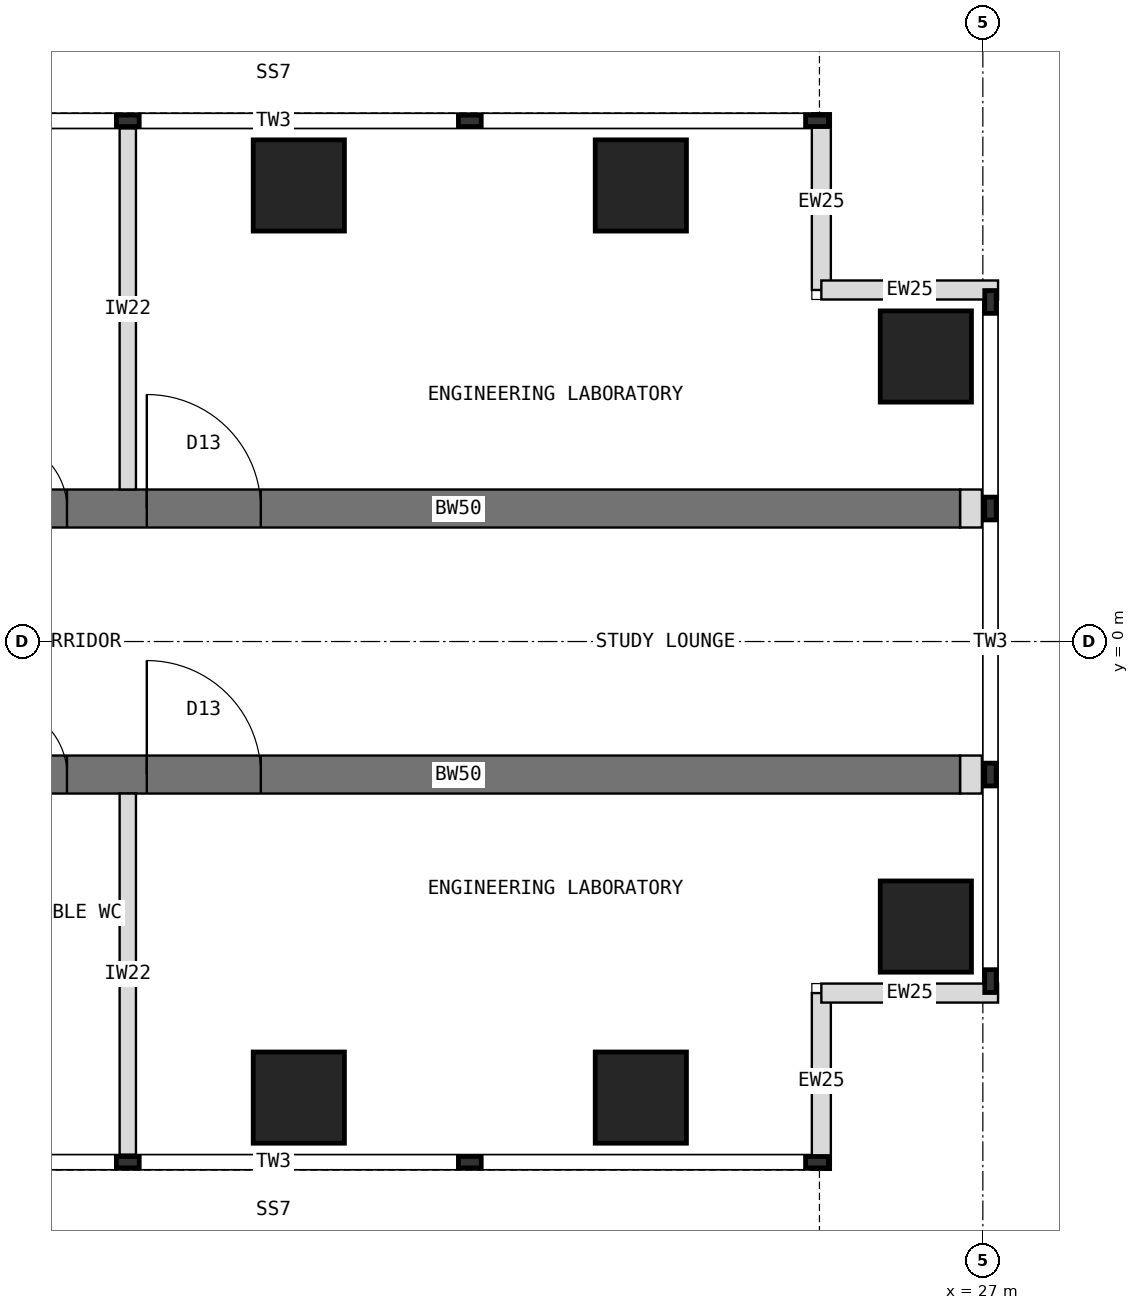
"""IFC4 building model, lengths in metres.
Left out: names, types, materials, properties, quantities, classifications, styles, units other than length and angle.
Written with IfcOpenShell. Run it as: python <this file> out.ifc"""

import sys

from ifc_helpers import new_model, si_unit, direction, frame, frame_2d, origin, origin_2d, place, context, subcontext, project, spatial, rectangle, extrude, element, fill, save


model = new_model("IFC4")
c1 = context("Model", 3, precision=1e-05, world=origin(), true_north=direction((0.0, 1.0)))
c2 = subcontext(c1, "Body", "Model", "MODEL_VIEW")
j1 = project(units=[si_unit("LENGTHUNIT", "METRE"), si_unit("PLANEANGLEUNIT", "RADIAN")], contexts=[c1])
p1 = place(None, origin())
s1 = spatial("IfcSite", under=j1, at=p1, CompositionType="ELEMENT")
p2 = place(p1, origin())
s2 = spatial("IfcBuilding", under=s1, at=p2, CompositionType="ELEMENT")
p3 = place(p2, frame((0.0, 0.0, 174.5)))
s3 = spatial("IfcBuildingStorey", under=s2, at=p3, CompositionType="ELEMENT", Elevation=174.5)
p4 = place(p3, frame((13.5, 1.75, 0.0), z_axis=(0.0, 0.0, 1.0), x_axis=(1.0, 0.0, 0.0)))
e1 = element("IfcWall", 1, at=p4, inside=s3, PredefinedType="SHEAR", context=c2, shape_type="SweptSolid", body=[
    extrude(rectangle(XDim=13.2, YDim=0.5, at=frame_2d((6.6, 0.0))), origin(), (0.0, 0.0, 1.0), 4.0),
])
p5 = place(p4, frame((0.55, 0.0, 0.0)))
e2 = element("IfcOpeningElement", 2, at=p5, cuts=e1, PredefinedType="OPENING", context=c2, shape_type="SweptSolid", body=[
    extrude(rectangle(XDim=0.9, YDim=2.1, at=frame_2d((0.45, 1.05))), frame((0.0, 0.26, 0.0), z_axis=(0.0, -1.0, 0.0), x_axis=(1.0, 0.0, 0.0)), (0.0, 0.0, 1.0), 0.52),
])
p6 = place(p4, frame((2.5, 0.0, 0.0)))
e3 = element("IfcOpeningElement", 3, at=p6, cuts=e1, PredefinedType="OPENING", context=c2, shape_type="SweptSolid", body=[
    extrude(rectangle(XDim=1.5, YDim=2.1, at=frame_2d((0.75, 1.05))), frame((0.0, 0.26, 0.0), z_axis=(0.0, -1.0, 0.0), x_axis=(1.0, 0.0, 0.0)), (0.0, 0.0, 1.0), 0.52),
])
p7 = place(p3, frame((13.5, -1.75, 0.0), z_axis=(0.0, 0.0, 1.0), x_axis=(1.0, 0.0, 0.0)))
e4 = element("IfcWall", 4, at=p7, inside=s3, PredefinedType="SHEAR", context=c2, shape_type="SweptSolid", body=[
    extrude(rectangle(XDim=13.2, YDim=0.5, at=frame_2d((6.6, 0.0))), origin(), (0.0, 0.0, 1.0), 4.0),
])
p8 = place(p7, frame((0.55, 0.0, 0.0)))
e5 = element("IfcOpeningElement", 5, at=p8, cuts=e4, PredefinedType="OPENING", context=c2, shape_type="SweptSolid", body=[
    extrude(rectangle(XDim=0.9, YDim=2.1, at=frame_2d((0.45, 1.05))), frame((0.0, 0.26, 0.0), z_axis=(0.0, -1.0, 0.0), x_axis=(1.0, 0.0, 0.0)), (0.0, 0.0, 1.0), 0.52),
])
p9 = place(p7, frame((2.5, 0.0, 0.0)))
e6 = element("IfcOpeningElement", 6, at=p9, cuts=e4, PredefinedType="OPENING", context=c2, shape_type="SweptSolid", body=[
    extrude(rectangle(XDim=1.5, YDim=2.1, at=frame_2d((0.75, 1.05))), frame((0.0, 0.26, 0.0), z_axis=(0.0, -1.0, 0.0), x_axis=(1.0, 0.0, 0.0)), (0.0, 0.0, 1.0), 0.52),
])
for number, where, z_axis, x_axis in (
    (7, (18.0, 6.0, 0.0), (0.0, 0.0, 1.0), (1.0, 0.0, 0.0)),
    (8, (18.0, -6.0, 0.0), (0.0, 0.0, 1.0), (1.0, 0.0, 0.0)),
    (9, (22.5, 6.0, 0.0), (0.0, 0.0, 1.0), (1.0, 0.0, 0.0)),
    (10, (22.5, -6.0, 0.0), (0.0, 0.0, 1.0), (1.0, 0.0, 0.0)),
    (11, (26.25, 3.75, 0.0), (0.0, 0.0, 1.0), (1.0, 0.0, 0.0)),
    (12, (26.25, -3.75, 0.0), (0.0, 0.0, 1.0), (1.0, 0.0, 0.0)),
):
    element("IfcColumn", number, at=place(p3, frame(where, z_axis=z_axis, x_axis=x_axis)), inside=s3, PredefinedType="COLUMN", context=c2, shape_type="SweptSolid", body=[
        extrude(rectangle(XDim=1.2, YDim=1.2, at=origin_2d()), origin(), (0.0, 0.0, 1.0), 4.0),
    ])
for number, where, z_axis, x_axis in (
    (13, (24.875, 6.95, 0.0), (0.0, 0.0, 1.0), (0.0, -1.0, 0.0)),
    (14, (24.875, 4.625, 0.0), (0.0, 0.0, 1.0), (1.0, 0.0, 0.0)),
    (15, (24.875, -6.95, 0.0), (0.0, 0.0, 1.0), (0.0, 1.0, 0.0)),
    (16, (24.875, -4.625, 0.0), (0.0, 0.0, 1.0), (1.0, 0.0, 0.0)),
):
    element("IfcWall", number, at=place(p3, frame(where, z_axis=z_axis, x_axis=x_axis)), inside=s3, PredefinedType="STANDARD", context=c2, shape_type="SweptSolid", body=[
        extrude(rectangle(XDim=2.325, YDim=0.25, at=frame_2d((1.163, 0.0))), origin(), (0.0, 0.0, 1.0), 3.8),
    ])
for number, where, z_axis, x_axis in (
    (17, (26.7, 1.75, 0.0), (0.0, 0.0, 1.0), (1.0, 0.0, 0.0)),
    (18, (26.7, -1.75, 0.0), (0.0, 0.0, 1.0), (1.0, 0.0, 0.0)),
):
    element("IfcWall", number, at=place(p3, frame(where, z_axis=z_axis, x_axis=x_axis)), inside=s3, PredefinedType="PARTITIONING", context=c2, shape_type="SweptSolid", body=[
        extrude(rectangle(XDim=0.288, YDim=0.5, at=frame_2d((0.144, 0.0))), origin(), (0.0, 0.0, 1.0), 3.8),
    ])
for number, where, z_axis, x_axis in (
    (19, (15.75, 2.0, 0.0), (0.0, 0.0, 1.0), (0.0, 1.0, 0.0)),
    (20, (15.75, -2.0, 0.0), (0.0, 0.0, 1.0), (0.0, -1.0, 0.0)),
):
    element("IfcWall", number, at=place(p3, frame(where, z_axis=z_axis, x_axis=x_axis)), inside=s3, PredefinedType="PARTITIONING", context=c2, shape_type="SweptSolid", body=[
        extrude(rectangle(XDim=4.75, YDim=0.215, at=frame_2d((2.375, 0.0))), origin(), (0.0, 0.0, 1.0), 3.8),
    ])
p10 = place(p5, origin())
e21 = element("IfcDoor", 21, at=p10, inside=s3, OperationType="SINGLE_SWING_LEFT", PredefinedType="DOOR", context=c2, shape_type="SweptSolid", body=[
    extrude(rectangle(XDim=0.9, YDim=2.1, at=frame_2d((0.45, 1.05))), frame((0.0, 0.025, 0.0), z_axis=(0.0, -1.0, 0.0), x_axis=(1.0, 0.0, 0.0)), (0.0, 0.0, 1.0), 0.05),
])
fill(e2, e21)
p11 = place(p6, origin())
e22 = element("IfcDoor", 22, at=p11, inside=s3, OperationType="DOUBLE_DOOR_SINGLE_SWING", PredefinedType="DOOR", context=c2, shape_type="SweptSolid", body=[
    extrude(rectangle(XDim=1.5, YDim=2.1, at=frame_2d((0.75, 1.05))), frame((0.0, 0.025, 0.0), z_axis=(0.0, -1.0, 0.0), x_axis=(1.0, 0.0, 0.0)), (0.0, 0.0, 1.0), 0.05),
])
fill(e3, e22)
p12 = place(p8, origin())
e23 = element("IfcDoor", 23, at=p12, inside=s3, OperationType="SINGLE_SWING_LEFT", PredefinedType="DOOR", context=c2, shape_type="SweptSolid", body=[
    extrude(rectangle(XDim=0.9, YDim=2.1, at=frame_2d((0.45, 1.05))), frame((0.0, 0.025, 0.0), z_axis=(0.0, -1.0, 0.0), x_axis=(1.0, 0.0, 0.0)), (0.0, 0.0, 1.0), 0.05),
])
fill(e5, e23)
p13 = place(p9, origin())
e24 = element("IfcDoor", 24, at=p13, inside=s3, OperationType="DOUBLE_DOOR_SINGLE_SWING", PredefinedType="DOOR", context=c2, shape_type="SweptSolid", body=[
    extrude(rectangle(XDim=1.5, YDim=2.1, at=frame_2d((0.75, 1.05))), frame((0.0, 0.025, 0.0), z_axis=(0.0, -1.0, 0.0), x_axis=(1.0, 0.0, 0.0)), (0.0, 0.0, 1.0), 0.05),
])
fill(e6, e24)
save(model, sys.argv[1])
